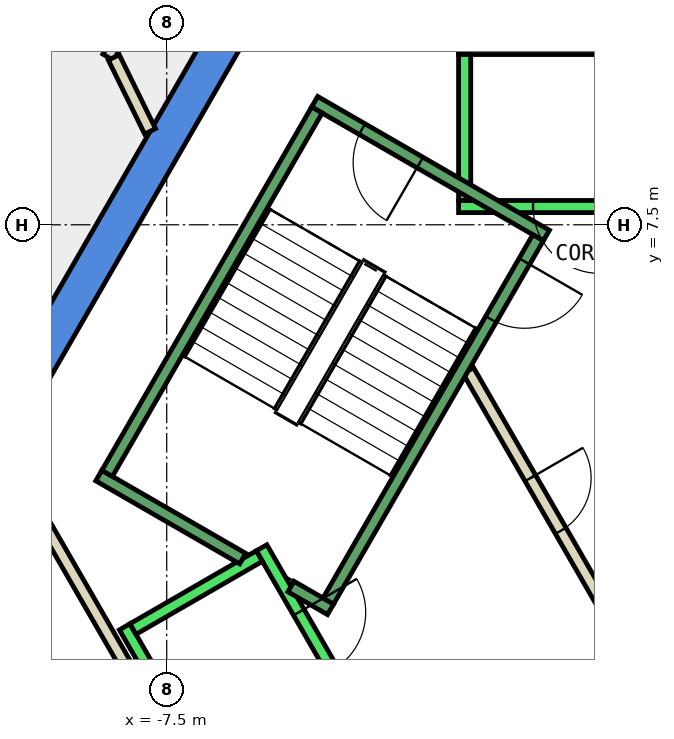
"""IFC4 building model, lengths in metres.
Left out: names, types, materials, properties, quantities, classifications, styles, units other than length and angle.
Written with IfcOpenShell. Run it as: python <this file> out.ifc"""

import sys

from ifc_helpers import new_model, si_unit, direction, frame, frame_2d, origin, place, context, subcontext, project, spatial, polyline, rectangle, outline, extrude, element, fill, save


model = new_model("IFC4")
c1 = context("Model", 3, precision=1e-05, world=origin(), true_north=direction((0.0, 1.0)))
c2 = subcontext(c1, "Body", "Model", "MODEL_VIEW")
j1 = project(units=[si_unit("LENGTHUNIT", "METRE"), si_unit("PLANEANGLEUNIT", "RADIAN")], contexts=[c1])
p1 = place(None, origin())
s1 = spatial("IfcSite", under=j1, at=p1, CompositionType="ELEMENT")
p2 = place(p1, origin())
s2 = spatial("IfcBuilding", under=s1, at=p2, CompositionType="ELEMENT")
p3 = place(p2, frame((0.0, 0.0, 270.2)))
s3 = spatial("IfcBuildingStorey", under=s2, at=p3, CompositionType="ELEMENT", Elevation=270.2)
p4 = place(p3, frame((0.0, 0.0, -0.34)))
e1 = element("IfcWall", 1, at=p4, inside=s3, PredefinedType="SHEAR", context=c2, shape_type="SweptSolid", body=[
    extrude(outline(polyline([(-10.535, 4.253), (-10.015, 3.953), (-5.427, 11.9), (-5.774, 12.5), (-10.535, 4.253)])), origin(), (0.0, 0.0, 1.0), 3.6),
])
p5 = place(p3, frame((0.0, 0.0, -0.34)))
e2 = element("IfcWall", 2, at=p5, inside=s3, PredefinedType="SHEAR", context=c2, shape_type="SweptSolid", body=[
    extrude(outline(polyline([(-11.547, 2.5), (-5.774, -7.5), (-5.427, -6.9), (-10.854, 2.5), (-11.547, 2.5)])), origin(), (0.0, 0.0, 1.0), 3.6),
])
p6 = place(p3, frame((-6.054, 14.264, 0.0), z_axis=(0.0, 0.0, 1.0), x_axis=(-0.515508653897, -0.856884372455, 0.0)))
e3 = element("IfcWall", 3, at=p6, inside=s3, PredefinedType="PARTITIONING", context=c2, shape_type="SweptSolid", body=[
    extrude(rectangle(XDim=4.677, YDim=0.2, at=frame_2d((2.339, 0.0))), origin(), (0.0, 0.0, 1.0), 3.26),
])
p7 = place(p6, frame((1.839, 0.0, 0.0)))
e4 = element("IfcOpeningElement", 4, at=p7, cuts=e3, PredefinedType="OPENING", context=c2, shape_type="SweptSolid", body=[
    extrude(rectangle(XDim=1.0, YDim=2.1, at=frame_2d((0.5, 1.05))), frame((0.0, 0.11, 0.0), z_axis=(0.0, -1.0, 0.0), x_axis=(1.0, 0.0, 0.0)), (0.0, 0.0, 1.0), 0.22),
])
p8 = place(p3, frame((-8.37, 10.252, 0.0), z_axis=(0.0, 0.0, 1.0), x_axis=(0.440562172885, -0.897722101668, 0.0)))
e5 = element("IfcWall", 5, at=p8, inside=s3, PredefinedType="PARTITIONING", context=c2, shape_type="SweptSolid", body=[
    extrude(rectangle(XDim=1.353, YDim=0.2, at=frame_2d((0.677, 0.0))), origin(), (0.0, 0.0, 1.0), 3.26),
])
p9 = place(p3, frame((-10.919, 10.057, 0.0), z_axis=(0.0, 0.0, 1.0), x_axis=(0.515568955032, 0.856848091908, 0.0)))
e6 = element("IfcWall", 6, at=p9, inside=s3, PredefinedType="PARTITIONING", context=c2, shape_type="SweptSolid", body=[
    extrude(rectangle(XDim=3.177, YDim=0.2, at=frame_2d((1.588, 0.0))), origin(), (0.0, 0.0, 1.0), 3.26),
])
p10 = place(p9, frame((1.088, 0.0, 0.0)))
e7 = element("IfcOpeningElement", 7, at=p10, cuts=e6, PredefinedType="OPENING", context=c2, shape_type="SweptSolid", body=[
    extrude(rectangle(XDim=1.0, YDim=2.1, at=frame_2d((0.5, 1.05))), frame((0.0, 0.11, 0.0), z_axis=(0.0, -1.0, 0.0), x_axis=(1.0, 0.0, 0.0)), (0.0, 0.0, 1.0), 0.22),
])
p11 = place(p3, frame((-9.751, 2.99, 0.0), z_axis=(0.0, 0.0, 1.0), x_axis=(0.500012163284, -0.866018381195, 0.0)))
e8 = element("IfcWall", 8, at=p11, inside=s3, PredefinedType="PARTITIONING", context=c2, shape_type="SweptSolid", body=[
    extrude(rectangle(XDim=8.0, YDim=0.2, at=frame_2d((4.0, 0.0))), origin(), (0.0, 0.0, 1.0), 3.26),
])
p12 = place(p3, frame((-0.982, -1.0, 0.0), z_axis=(0.0, 0.0, 1.0), x_axis=(0.50024047865, 0.865886518847, 0.0)))
e9 = element("IfcWall", 9, at=p12, inside=s3, PredefinedType="PARTITIONING", context=c2, shape_type="SweptSolid", body=[
    extrude(rectangle(XDim=1.863, YDim=0.2, at=frame_2d((0.931, 0.0))), origin(), (0.0, 0.0, 1.0), 3.26),
])
p13 = place(p3, frame((-2.54, 5.1, 0.0), z_axis=(0.0, 0.0, 1.0), x_axis=(0.499925051871, -0.866068670783, 0.0)))
e10 = element("IfcWall", 10, at=p13, inside=s3, PredefinedType="PARTITIONING", context=c2, shape_type="SweptSolid", body=[
    extrude(rectangle(XDim=5.181, YDim=0.2, at=frame_2d((2.59, 0.0))), origin(), (0.0, 0.0, 1.0), 3.26),
])
p14 = place(p13, frame((2.04, 0.0, 0.0)))
e11 = element("IfcOpeningElement", 11, at=p14, cuts=e10, PredefinedType="OPENING", context=c2, shape_type="SweptSolid", body=[
    extrude(rectangle(XDim=1.0, YDim=2.1, at=frame_2d((0.5, 1.05))), frame((0.0, 0.11, 0.0), z_axis=(0.0, -1.0, 0.0), x_axis=(1.0, 0.0, 0.0)), (0.0, 0.0, 1.0), 0.22),
])
p15 = place(p3, frame((2.7, 7.8, 0.0), z_axis=(0.0, 0.0, 1.0), x_axis=(-1.0, 0.0, 0.0)))
e12 = element("IfcWall", 12, at=p15, inside=s3, PredefinedType="STANDARD", context=c2, shape_type="SweptSolid", body=[
    extrude(rectangle(XDim=5.4, YDim=0.2, at=frame_2d((2.7, 0.0))), origin(), (0.0, 0.0, 1.0), 3.26),
])
p16 = place(p15, frame((1.225, 0.0, 0.0)))
e13 = element("IfcOpeningElement", 13, at=p16, cuts=e12, PredefinedType="OPENING", context=c2, shape_type="SweptSolid", body=[
    extrude(rectangle(XDim=1.1, YDim=2.1, at=frame_2d((0.55, 1.05))), frame((0.0, 0.11, 0.0), z_axis=(0.0, -1.0, 0.0), x_axis=(1.0, 0.0, 0.0)), (0.0, 0.0, 1.0), 0.22),
])
p17 = place(p15, frame((3.075, 0.0, 0.0)))
e14 = element("IfcOpeningElement", 14, at=p17, cuts=e12, PredefinedType="OPENING", context=c2, shape_type="SweptSolid", body=[
    extrude(rectangle(XDim=1.1, YDim=2.1, at=frame_2d((0.55, 1.05))), frame((0.0, 0.11, 0.0), z_axis=(0.0, -1.0, 0.0), x_axis=(1.0, 0.0, 0.0)), (0.0, 0.0, 1.0), 0.22),
])
p18 = place(p3, frame((2.7, 10.4, 0.0), z_axis=(0.0, 0.0, 1.0), x_axis=(-1.0, 0.0, 0.0)))
e15 = element("IfcWall", 15, at=p18, inside=s3, PredefinedType="STANDARD", context=c2, shape_type="SweptSolid", body=[
    extrude(rectangle(XDim=5.4, YDim=0.2, at=frame_2d((2.7, 0.0))), origin(), (0.0, 0.0, 1.0), 3.26),
])
p19 = place(p3, frame((-2.6, 7.9, 0.0), z_axis=(0.0, 0.0, 1.0), x_axis=(0.0, 1.0, 0.0)))
e16 = element("IfcWall", 16, at=p19, inside=s3, PredefinedType="STANDARD", context=c2, shape_type="SweptSolid", body=[
    extrude(rectangle(XDim=2.4, YDim=0.2, at=frame_2d((1.2, 0.0))), origin(), (0.0, 0.0, 1.0), 3.26),
])
p20 = place(p3, frame((-5.94, 2.188, 0.0), z_axis=(0.0, 0.0, 1.0), x_axis=(0.500034260056, -0.866005622828, 0.0)))
e17 = element("IfcWall", 17, at=p20, inside=s3, PredefinedType="STANDARD", context=c2, shape_type="SweptSolid", body=[
    extrude(rectangle(XDim=5.399, YDim=0.2, at=frame_2d((2.7, 0.0))), origin(), (0.0, 0.0, 1.0), 3.26),
])
p21 = place(p20, frame((3.075, 0.0, 0.0)))
e18 = element("IfcOpeningElement", 18, at=p21, cuts=e17, PredefinedType="OPENING", context=c2, shape_type="SweptSolid", body=[
    extrude(rectangle(XDim=1.1, YDim=2.1, at=frame_2d((0.55, 1.05))), frame((0.0, 0.11, 0.0), z_axis=(0.0, -1.0, 0.0), x_axis=(1.0, 0.0, 0.0)), (0.0, 0.0, 1.0), 0.22),
])
p22 = place(p20, frame((1.225, 0.0, 0.0)))
e19 = element("IfcOpeningElement", 19, at=p22, cuts=e17, PredefinedType="OPENING", context=c2, shape_type="SweptSolid", body=[
    extrude(rectangle(XDim=1.1, YDim=2.1, at=frame_2d((0.55, 1.05))), frame((0.0, 0.11, 0.0), z_axis=(0.0, -1.0, 0.0), x_axis=(1.0, 0.0, 0.0)), (0.0, 0.0, 1.0), 0.22),
])
p23 = place(p3, frame((-8.192, 0.888, 0.0), z_axis=(0.0, 0.0, 1.0), x_axis=(0.500034260056, -0.866005622828, 0.0)))
e20 = element("IfcWall", 20, at=p23, inside=s3, PredefinedType="STANDARD", context=c2, shape_type="SweptSolid", body=[
    extrude(rectangle(XDim=5.399, YDim=0.2, at=frame_2d((2.7, 0.0))), origin(), (0.0, 0.0, 1.0), 3.26),
])
p24 = place(p3, frame((-5.977, 2.052, 0.0), z_axis=(0.0, 0.0, 1.0), x_axis=(-0.865973769406, -0.500089422704, 0.0)))
e21 = element("IfcWall", 21, at=p24, inside=s3, PredefinedType="STANDARD", context=c2, shape_type="SweptSolid", body=[
    extrude(rectangle(XDim=2.399, YDim=0.2, at=frame_2d((1.2, 0.0))), origin(), (0.0, 0.0, 1.0), 3.26),
])
p25 = place(p3, frame((-1.256, 7.324, 0.0), z_axis=(0.0, 0.0, 1.0), x_axis=(-0.866046073146, 0.499964197906, 0.0)))
e22 = element("IfcWall", 22, at=p25, inside=s3, PredefinedType="STANDARD", context=c2, shape_type="SweptSolid", body=[
    extrude(rectangle(XDim=4.4, YDim=0.2, at=frame_2d((2.2, 0.0))), origin(), (0.0, 0.0, 1.0), 3.26),
])
p26 = place(p25, frame((2.4, 0.0, 0.0)))
e23 = element("IfcOpeningElement", 23, at=p26, cuts=e22, PredefinedType="OPENING", context=c2, shape_type="SweptSolid", body=[
    extrude(rectangle(XDim=1.1, YDim=2.2, at=frame_2d((0.55, 1.1))), frame((0.0, 0.11, 0.0), z_axis=(0.0, -1.0, 0.0), x_axis=(1.0, 0.0, 0.0)), (0.0, 0.0, 1.0), 0.22),
])
p27 = place(p3, frame((-6.25, 2.01, 0.0), z_axis=(0.0, 0.0, 1.0), x_axis=(-0.86611865017, 0.499838457731, 0.0)))
e24 = element("IfcWall", 24, at=p27, inside=s3, PredefinedType="STANDARD", context=c2, shape_type="SweptSolid", body=[
    extrude(rectangle(XDim=2.733, YDim=0.2, at=frame_2d((1.366, 0.0))), origin(), (0.0, 0.0, 1.0), 3.26),
])
p28 = place(p3, frame((-4.806, 1.176, 0.0), z_axis=(0.0, 0.0, 1.0), x_axis=(-0.866558586415, 0.499075361355, 0.0)))
e25 = element("IfcWall", 25, at=p28, inside=s3, PredefinedType="STANDARD", context=c2, shape_type="SweptSolid", body=[
    extrude(rectangle(XDim=0.751, YDim=0.2, at=frame_2d((0.376, 0.0))), origin(), (0.0, 0.0, 1.0), 3.26),
])
p29 = place(p3, frame((-1.393, 7.288, 0.0), z_axis=(0.0, 0.0, 1.0), x_axis=(-0.499963383562, -0.866046543262, 0.0)))
e26 = element("IfcWall", 26, at=p29, inside=s3, PredefinedType="STANDARD", context=c2, shape_type="SweptSolid", body=[
    extrude(rectangle(XDim=6.9, YDim=0.2, at=frame_2d((3.45, 0.0))), origin(), (0.0, 0.0, 1.0), 3.26),
])
p30 = place(p29, frame((0.45, 0.0, 0.0)))
e27 = element("IfcOpeningElement", 27, at=p30, cuts=e26, PredefinedType="OPENING", context=c2, shape_type="SweptSolid", body=[
    extrude(rectangle(XDim=1.1, YDim=2.2, at=frame_2d((0.55, 1.1))), frame((0.0, 0.11, 0.0), z_axis=(0.0, -1.0, 0.0), x_axis=(1.0, 0.0, 0.0)), (0.0, 0.0, 1.0), 0.22),
])
p31 = place(p3, frame((-5.03, 9.388, 0.0), z_axis=(0.0, 0.0, 1.0), x_axis=(-0.499978703459, -0.866037698999, 0.0)))
e28 = element("IfcWall", 28, at=p31, inside=s3, PredefinedType="STANDARD", context=c2, shape_type="SweptSolid", body=[
    extrude(rectangle(XDim=6.9, YDim=0.2, at=frame_2d((3.45, 0.0))), origin(), (0.0, 0.0, 1.0), 3.26),
])
p32 = place(p14, origin())
e29 = element("IfcDoor", 29, at=p32, inside=s3, OperationType="SINGLE_SWING_RIGHT", PredefinedType="DOOR", context=c2, shape_type="SweptSolid", body=[
    extrude(rectangle(XDim=1.0, YDim=2.1, at=frame_2d((0.5, 1.05))), frame((0.0, 0.025, 0.0), z_axis=(0.0, -1.0, 0.0), x_axis=(1.0, 0.0, 0.0)), (0.0, 0.0, 1.0), 0.05),
])
fill(e11, e29)
p33 = place(p17, origin())
e30 = element("IfcDoor", 30, at=p33, inside=s3, OperationType="SLIDING_TO_LEFT", PredefinedType="DOOR", context=c2, shape_type="SweptSolid", body=[
    extrude(rectangle(XDim=1.1, YDim=2.1, at=frame_2d((0.55, 1.05))), frame((0.0, 0.025, 0.0), z_axis=(0.0, -1.0, 0.0), x_axis=(1.0, 0.0, 0.0)), (0.0, 0.0, 1.0), 0.05),
])
fill(e14, e30)
p34 = place(p22, origin())
e31 = element("IfcDoor", 31, at=p34, inside=s3, OperationType="SLIDING_TO_LEFT", PredefinedType="DOOR", context=c2, shape_type="SweptSolid", body=[
    extrude(rectangle(XDim=1.1, YDim=2.1, at=frame_2d((0.55, 1.05))), frame((0.0, 0.025, 0.0), z_axis=(0.0, -1.0, 0.0), x_axis=(1.0, 0.0, 0.0)), (0.0, 0.0, 1.0), 0.05),
])
fill(e19, e31)
p35 = place(p30, origin())
e32 = element("IfcDoor", 32, at=p35, inside=s3, OperationType="SINGLE_SWING_LEFT", PredefinedType="DOOR", context=c2, shape_type="SweptSolid", body=[
    extrude(rectangle(XDim=1.1, YDim=2.2, at=frame_2d((0.55, 1.1))), frame((0.0, 0.025, 0.0), z_axis=(0.0, -1.0, 0.0), x_axis=(1.0, 0.0, 0.0)), (0.0, 0.0, 1.0), 0.05),
])
fill(e27, e32)
p36 = place(p26, origin())
e33 = element("IfcDoor", 33, at=p36, inside=s3, OperationType="SINGLE_SWING_LEFT", PredefinedType="DOOR", context=c2, shape_type="SweptSolid", body=[
    extrude(rectangle(XDim=1.1, YDim=2.2, at=frame_2d((0.55, 1.1))), frame((0.0, 0.025, 0.0), z_axis=(0.0, -1.0, 0.0), x_axis=(1.0, 0.0, 0.0)), (0.0, 0.0, 1.0), 0.05),
])
fill(e23, e33)
save(model, sys.argv[1])
